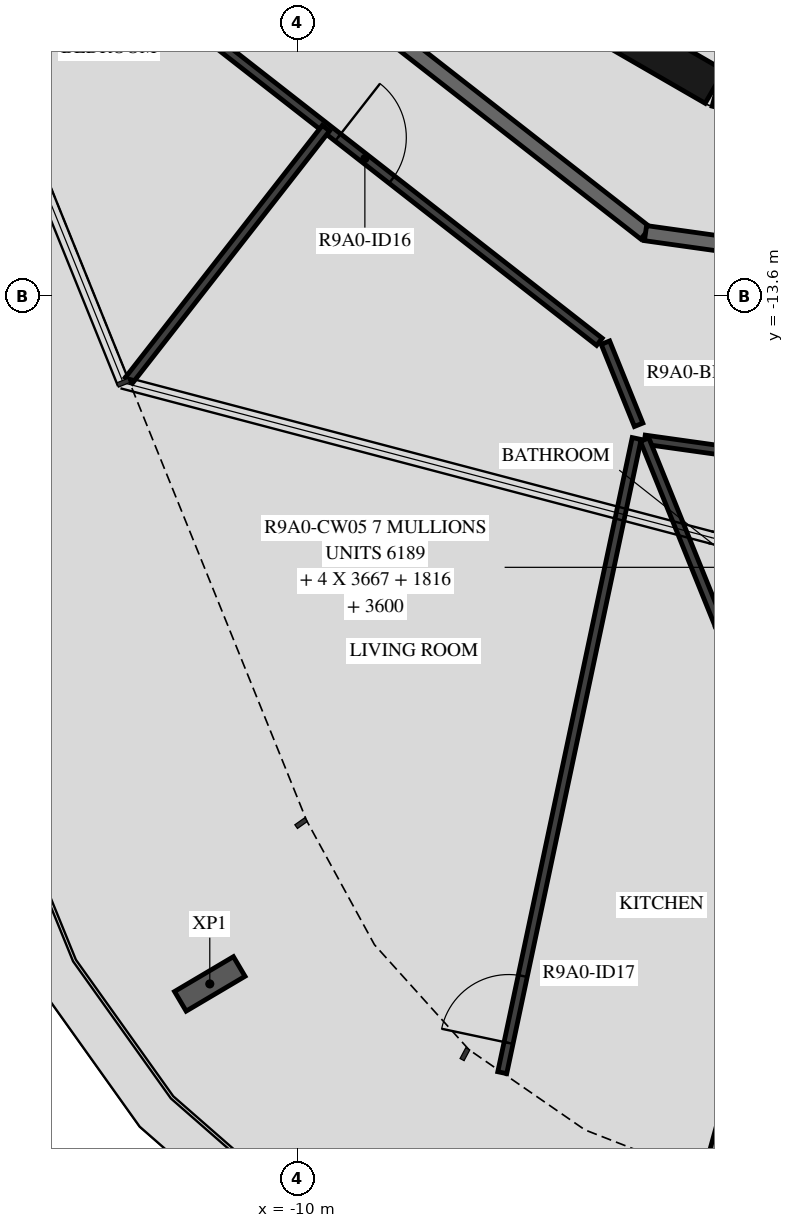
"""IFC4 building model, lengths in metres.
Left out: names, types, materials, properties, quantities, classifications, styles, units other than length and angle.
Written with IfcOpenShell. Run it as: python <this file> out.ifc"""

import sys

from ifc_helpers import new_model, si_unit, direction, frame, frame_2d, origin, origin_2d, place, context, subcontext, project, spatial, rectangle, i_section, extrude, element, fill, save


model = new_model("IFC4")
c1 = context("Model", 3, precision=1e-05, world=origin(), true_north=direction((0.0, 1.0)))
c2 = subcontext(c1, "Body", "Model", "MODEL_VIEW")
j1 = project(units=[si_unit("LENGTHUNIT", "METRE"), si_unit("PLANEANGLEUNIT", "RADIAN")], contexts=[c1])
p1 = place(None, origin())
s1 = spatial("IfcSite", under=j1, at=p1, CompositionType="ELEMENT")
p2 = place(p1, origin())
s2 = spatial("IfcBuilding", under=s1, at=p2, CompositionType="ELEMENT")
p3 = place(p2, frame((0.0, 0.0, 333.0)))
s3 = spatial("IfcBuildingStorey", under=s2, at=p3, CompositionType="ELEMENT", Elevation=333.0)
p4 = place(p3, frame((-11.153, -22.647, -0.45), z_axis=(0.0, 0.0, 1.0), x_axis=(-0.509114042361, 0.86069907161, 0.0)))
e1 = element("IfcColumn", 1, at=p4, inside=s3, PredefinedType="COLUMN", context=c2, shape_type="SweptSolid", body=[
    extrude(i_section(OverallWidth=0.3, OverallDepth=0.9, WebThickness=0.019, FlangeThickness=0.035, FilletRadius=0.03, at=origin_2d()), origin(), (0.0, 0.0, 1.0), 3.57),
])
for number, where, z_axis, x_axis in (
    (2, (-7.137, -9.329, 0.0), (0.0, 0.0, 1.0), (0.866, -0.5, 0.0)),
    (3, (-4.479, -10.858, 0.0), (0.0, 0.0, 1.0), (0.966, -0.259, 0.0)),
):
    element("IfcWall", number, at=place(p3, frame(where, z_axis=z_axis, x_axis=x_axis)), inside=s3, PredefinedType="SHEAR", context=c2, shape_type="SweptSolid", body=[
        extrude(rectangle(XDim=3.033, YDim=0.5, at=frame_2d((1.516, 0.0))), origin(), (0.0, 0.0, 1.0), 3.12),
    ])
p5 = place(p3, frame((-11.079, -8.349, 0.0), z_axis=(0.0, 0.0, 1.0), x_axis=(0.78800478687, -0.615669112324, 0.0)))
e4 = element("IfcWall", 4, at=p5, inside=s3, PredefinedType="STANDARD", context=c2, shape_type="SweptSolid", body=[
    extrude(rectangle(XDim=7.181, YDim=0.2, at=frame_2d((3.591, 0.0))), origin(), (0.0, 0.0, 1.0), 3.12),
])
p6 = place(p3, frame((-5.42, -12.77, 0.0), z_axis=(0.0, 0.0, 1.0), x_axis=(0.990270565508, -0.139155334385, 0.0)))
e5 = element("IfcWall", 5, at=p6, inside=s3, PredefinedType="STANDARD", context=c2, shape_type="SweptSolid", body=[
    extrude(rectangle(XDim=7.181, YDim=0.2, at=frame_2d((3.59, 0.0))), origin(), (0.0, 0.0, 1.0), 3.12),
])
p7 = place(p6, frame((2.39, 0.0, 0.0)))
e6 = element("IfcOpeningElement", 6, at=p7, cuts=e5, PredefinedType="OPENING", context=c2, shape_type="SweptSolid", body=[
    extrude(rectangle(XDim=1.0, YDim=2.1, at=frame_2d((0.5, 1.05))), frame((0.0, 0.11, 0.0), z_axis=(0.0, -1.0, 0.0), x_axis=(1.0, 0.0, 0.0)), (0.0, 0.0, 1.0), 0.22),
])
p8 = place(p6, frame((4.091, 0.0, 0.0)))
e7 = element("IfcOpeningElement", 7, at=p8, cuts=e5, PredefinedType="OPENING", context=c2, shape_type="SweptSolid", body=[
    extrude(rectangle(XDim=1.0, YDim=2.1, at=frame_2d((0.5, 1.05))), frame((0.0, 0.11, 0.0), z_axis=(0.0, -1.0, 0.0), x_axis=(1.0, 0.0, 0.0)), (0.0, 0.0, 1.0), 0.22),
])
p9 = place(p3, frame((-4.574, -25.21, 0.0), z_axis=(0.0, 0.0, 1.0), x_axis=(0.264579024648, 0.964364007892, 0.0)))
e8 = element("IfcWall", 8, at=p9, inside=s3, PredefinedType="STANDARD", context=c2, shape_type="SweptSolid", body=[
    extrude(rectangle(XDim=6.486, YDim=0.2, at=frame_2d((3.243, 0.0))), origin(), (0.0, 0.0, 1.0), 2.73),
])
p10 = place(p3, frame((-12.319, -9.283, 0.0), z_axis=(0.0, 0.0, 1.0), x_axis=(0.788000268464, -0.61567489546, 0.0)))
e9 = element("IfcWall", 9, at=p10, inside=s3, PredefinedType="PARTITIONING", context=c2, shape_type="SweptSolid", body=[
    extrude(rectangle(XDim=7.985, YDim=0.12, at=frame_2d((3.992, 0.0))), origin(), (0.0, 0.0, 1.0), 3.12),
])
p11 = place(p10, frame((3.619, 0.0, 0.0)))
e10 = element("IfcOpeningElement", 10, at=p11, cuts=e9, PredefinedType="OPENING", context=c2, shape_type="SweptSolid", body=[
    extrude(rectangle(XDim=0.9, YDim=2.1, at=frame_2d((0.45, 1.05))), frame((0.0, 0.07, 0.0), z_axis=(0.0, -1.0, 0.0), x_axis=(1.0, 0.0, 0.0)), (0.0, 0.0, 1.0), 0.14),
])
p12 = place(p3, frame((-5.948, -14.21, 0.0), z_axis=(0.0, 0.0, 1.0), x_axis=(0.374601530156, -0.927185900241, 0.0)))
e11 = element("IfcWall", 11, at=p12, inside=s3, PredefinedType="PARTITIONING", context=c2, shape_type="SweptSolid", body=[
    extrude(rectangle(XDim=1.166, YDim=0.12, at=frame_2d((0.583, 0.0))), origin(), (0.0, 0.0, 1.0), 3.12),
])
p13 = place(p3, frame((-5.433, -15.487, 0.0), z_axis=(0.0, 0.0, 1.0), x_axis=(0.990268451053, -0.139170380644, 0.0)))
e12 = element("IfcWall", 12, at=p13, inside=s3, PredefinedType="PARTITIONING", context=c2, shape_type="SweptSolid", body=[
    extrude(rectangle(XDim=1.595, YDim=0.12, at=frame_2d((0.797, 0.0))), origin(), (0.0, 0.0, 1.0), 3.12),
])
p14 = place(p3, frame((-12.219, -14.708, 0.0), z_axis=(0.0, 0.0, 1.0), x_axis=(0.615656413137, 0.788014708596, 0.0)))
e13 = element("IfcWall", 13, at=p14, inside=s3, PredefinedType="PARTITIONING", context=c2, shape_type="SweptSolid", body=[
    extrude(rectangle(XDim=4.213, YDim=0.12, at=frame_2d((2.106, 0.0))), origin(), (0.0, 0.0, 1.0), 3.12),
])
p15 = place(p3, frame((-7.305, -23.815, 0.0), z_axis=(0.0, 0.0, 1.0), x_axis=(0.207366409306, 0.978263345062, 0.0)))
e14 = element("IfcWall", 14, at=p15, inside=s3, PredefinedType="PARTITIONING", context=c2, shape_type="SweptSolid", body=[
    extrude(rectangle(XDim=8.529, YDim=0.12, at=frame_2d((4.264, 0.0))), origin(), (0.0, 0.0, 1.0), 3.12),
])
p16 = place(p15, frame((0.4, 0.0, 0.0)))
e15 = element("IfcOpeningElement", 15, at=p16, cuts=e14, PredefinedType="OPENING", context=c2, shape_type="SweptSolid", body=[
    extrude(rectangle(XDim=0.9, YDim=2.1, at=frame_2d((0.45, 1.05))), frame((0.0, 0.07, 0.0), z_axis=(0.0, -1.0, 0.0), x_axis=(1.0, 0.0, 0.0)), (0.0, 0.0, 1.0), 0.14),
])
p17 = place(p3, frame((-4.445, -17.93, 0.0), z_axis=(0.0, 0.0, 1.0), x_axis=(-0.374614676827, 0.927180588616, 0.0)))
e16 = element("IfcWall", 16, at=p17, inside=s3, PredefinedType="PARTITIONING", context=c2, shape_type="SweptSolid", body=[
    extrude(rectangle(XDim=2.635, YDim=0.12, at=frame_2d((1.318, 0.0))), origin(), (0.0, 0.0, 1.0), 3.12),
])
p18 = place(p11, origin())
e17 = element("IfcDoor", 17, at=p18, inside=s3, OperationType="SINGLE_SWING_RIGHT", PredefinedType="DOOR", context=c2, shape_type="SweptSolid", body=[
    extrude(rectangle(XDim=0.9, YDim=2.1, at=frame_2d((0.45, 1.05))), frame((0.0, 0.025, 0.0), z_axis=(0.0, -1.0, 0.0), x_axis=(1.0, 0.0, 0.0)), (0.0, 0.0, 1.0), 0.05),
])
fill(e10, e17)
p19 = place(p16, origin())
e18 = element("IfcDoor", 18, at=p19, inside=s3, OperationType="SINGLE_SWING_RIGHT", PredefinedType="DOOR", context=c2, shape_type="SweptSolid", body=[
    extrude(rectangle(XDim=0.9, YDim=2.1, at=frame_2d((0.45, 1.05))), frame((0.0, 0.025, 0.0), z_axis=(0.0, -1.0, 0.0), x_axis=(1.0, 0.0, 0.0)), (0.0, 0.0, 1.0), 0.05),
])
fill(e15, e18)
save(model, sys.argv[1])
